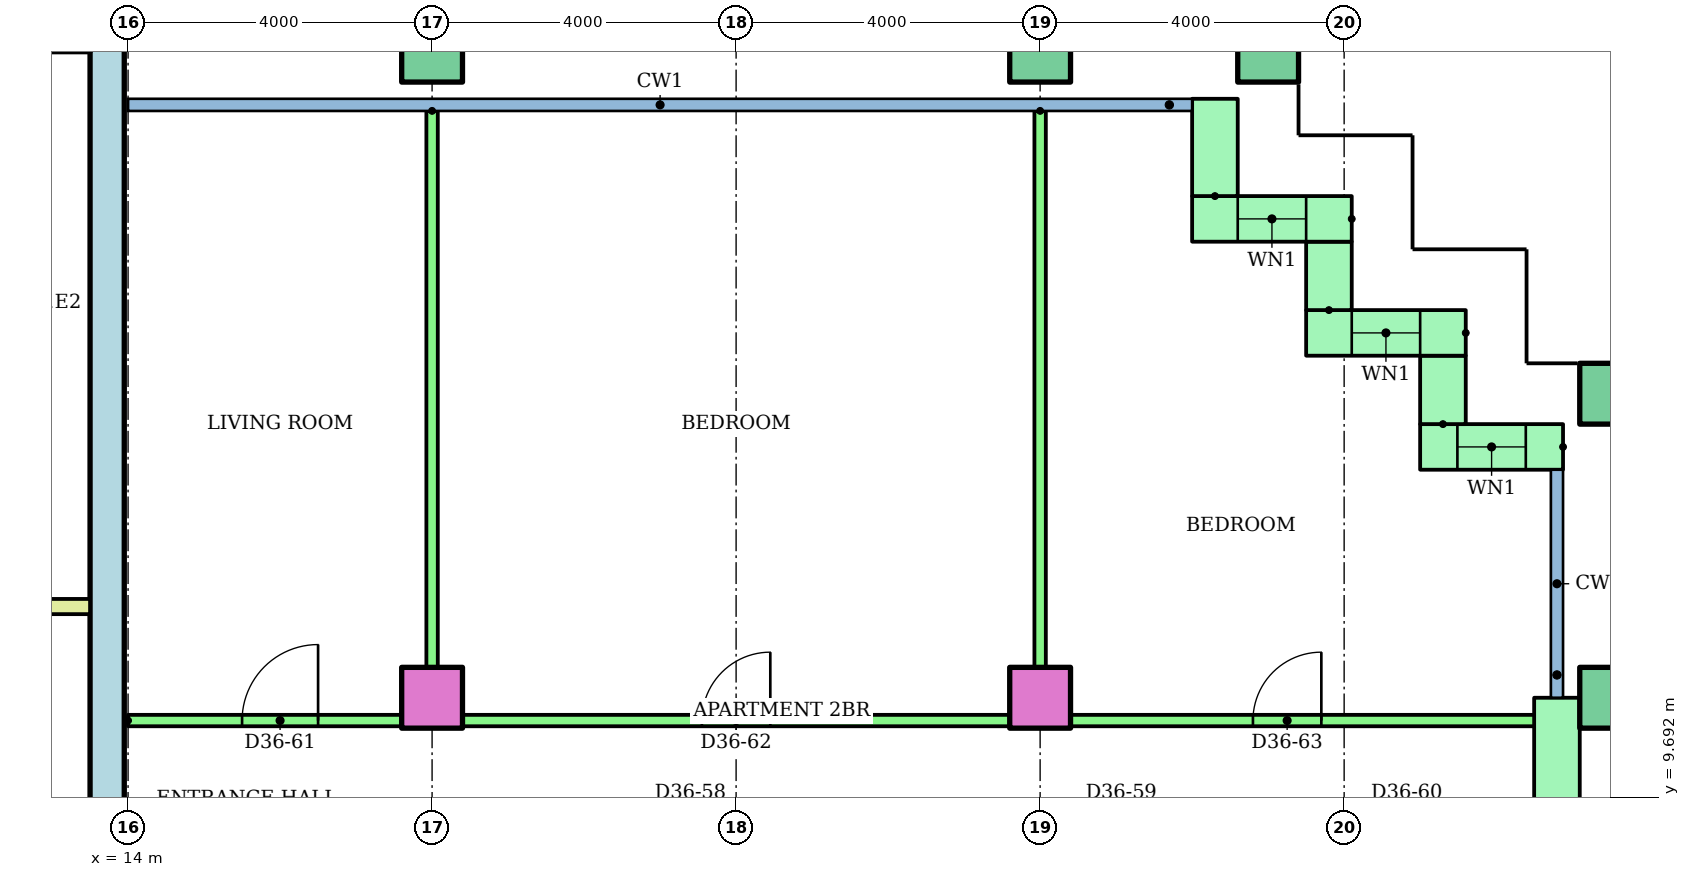
"""IFC4 building model, lengths in metres.
Left out: names, types, materials, properties, quantities, classifications, styles, units other than length and angle.
Written with IfcOpenShell. Run it as: python <this file> out.ifc"""

import sys

from ifc_helpers import new_model, si_unit, direction, frame, frame_2d, origin, origin_2d, place, context, subcontext, project, spatial, rectangle, hollow_rectangle, extrude, element, fill, save


model = new_model("IFC4")
c1 = context("Model", 3, precision=1e-05, world=origin(), true_north=direction((0.0, 1.0)))
c2 = subcontext(c1, "Body", "Model", "MODEL_VIEW")
j1 = project(units=[si_unit("LENGTHUNIT", "METRE"), si_unit("PLANEANGLEUNIT", "RADIAN")], contexts=[c1])
p1 = place(None, origin())
s1 = spatial("IfcSite", under=j1, at=p1, CompositionType="ELEMENT")
p2 = place(p1, origin())
s2 = spatial("IfcBuilding", under=s1, at=p2, CompositionType="ELEMENT")
p3 = place(p2, frame((0.0, 0.0, 139.0)))
s3 = spatial("IfcBuildingStorey", under=s2, at=p3, CompositionType="ELEMENT", Elevation=139.0)
for number, where in (
    (1, (18.0, 11.0, 0.0)),
    (2, (26.0, 11.0, 0.0)),
):
    element("IfcColumn", number, at=place(p3, frame(where)), inside=s3, PredefinedType="COLUMN", context=c2, shape_type="SweptSolid", body=[
        extrude(rectangle(XDim=0.8, YDim=0.8, at=origin_2d()), origin(), (0.0, 0.0, 1.0), 3.2),
    ])
for number, where in (
    (3, (33.5, 11.0, 0.0)),
    (4, (33.5, 15.0, 0.0)),
    (5, (18.0, 19.5, 0.0)),
    (6, (26.0, 19.5, 0.0)),
    (7, (29.0, 19.5, 0.0)),
):
    element("IfcColumn", number, at=place(p3, frame(where)), inside=s3, PredefinedType="COLUMN", context=c2, shape_type="SweptSolid", body=[
        extrude(hollow_rectangle(XDim=0.8, YDim=0.8, WallThickness=0.04, at=origin_2d()), origin(), (0.0, 0.0, 1.0), 3.2),
    ])
p4 = place(p3, frame((32.88, 14.3, 0.0), z_axis=(0.0, 0.0, 1.0), x_axis=(-1.0, 0.0, 0.0)))
e8 = element("IfcWall", 8, at=p4, inside=s3, PredefinedType="STANDARD", context=c2, shape_type="SweptSolid", body=[
    extrude(rectangle(XDim=1.88, YDim=0.6, at=frame_2d((0.94, 0.0))), origin(), (0.0, 0.0, 1.0), 2.92),
])
p5 = place(p4, frame((0.49, 0.0, 0.9)))
e9 = element("IfcOpeningElement", 9, at=p5, cuts=e8, PredefinedType="OPENING", context=c2, shape_type="SweptSolid", body=[
    extrude(rectangle(XDim=0.9, YDim=1.5, at=frame_2d((0.45, 0.75))), frame((0.0, 0.31, 0.0), z_axis=(0.0, -1.0, 0.0), x_axis=(1.0, 0.0, 0.0)), (0.0, 0.0, 1.0), 0.62),
])
p6 = place(p3, frame((31.3, 14.6, 0.0), z_axis=(0.0, 0.0, 1.0), x_axis=(0.0, 1.0, 0.0)))
e10 = element("IfcWall", 10, at=p6, inside=s3, PredefinedType="STANDARD", context=c2, shape_type="SweptSolid", body=[
    extrude(rectangle(XDim=0.9, YDim=0.6, at=frame_2d((0.45, 0.0))), origin(), (0.0, 0.0, 1.0), 2.92),
])
p7 = place(p3, frame((31.6, 15.8, 0.0), z_axis=(0.0, 0.0, 1.0), x_axis=(-1.0, 0.0, 0.0)))
e11 = element("IfcWall", 11, at=p7, inside=s3, PredefinedType="STANDARD", context=c2, shape_type="SweptSolid", body=[
    extrude(rectangle(XDim=2.1, YDim=0.6, at=frame_2d((1.05, 0.0))), origin(), (0.0, 0.0, 1.0), 2.92),
])
p8 = place(p7, frame((0.6, 0.0, 0.9)))
e12 = element("IfcOpeningElement", 12, at=p8, cuts=e11, PredefinedType="OPENING", context=c2, shape_type="SweptSolid", body=[
    extrude(rectangle(XDim=0.9, YDim=1.5, at=frame_2d((0.45, 0.75))), frame((0.0, 0.31, 0.0), z_axis=(0.0, -1.0, 0.0), x_axis=(1.0, 0.0, 0.0)), (0.0, 0.0, 1.0), 0.62),
])
p9 = place(p3, frame((29.8, 16.1, 0.0), z_axis=(0.0, 0.0, 1.0), x_axis=(0.0, 1.0, 0.0)))
e13 = element("IfcWall", 13, at=p9, inside=s3, PredefinedType="STANDARD", context=c2, shape_type="SweptSolid", body=[
    extrude(rectangle(XDim=0.9, YDim=0.6, at=frame_2d((0.45, 0.0))), origin(), (0.0, 0.0, 1.0), 2.92),
])
p10 = place(p3, frame((30.1, 17.3, 0.0), z_axis=(0.0, 0.0, 1.0), x_axis=(-1.0, 0.0, 0.0)))
e14 = element("IfcWall", 14, at=p10, inside=s3, PredefinedType="STANDARD", context=c2, shape_type="SweptSolid", body=[
    extrude(rectangle(XDim=2.1, YDim=0.6, at=frame_2d((1.05, 0.0))), origin(), (0.0, 0.0, 1.0), 2.92),
])
p11 = place(p10, frame((0.6, 0.0, 0.9)))
e15 = element("IfcOpeningElement", 15, at=p11, cuts=e14, PredefinedType="OPENING", context=c2, shape_type="SweptSolid", body=[
    extrude(rectangle(XDim=0.9, YDim=1.5, at=frame_2d((0.45, 0.75))), frame((0.0, 0.31, 0.0), z_axis=(0.0, -1.0, 0.0), x_axis=(1.0, 0.0, 0.0)), (0.0, 0.0, 1.0), 0.62),
])
p12 = place(p3, frame((28.3, 17.6, 0.0), z_axis=(0.0, 0.0, 1.0), x_axis=(0.0, 1.0, 0.0)))
e16 = element("IfcWall", 16, at=p12, inside=s3, PredefinedType="STANDARD", context=c2, shape_type="SweptSolid", body=[
    extrude(rectangle(XDim=1.28, YDim=0.6, at=frame_2d((0.64, 0.0))), origin(), (0.0, 0.0, 1.0), 2.92),
])
p13 = place(p3, frame((32.8, 6.5, 0.0), z_axis=(0.0, 0.0, 1.0), x_axis=(0.0, 1.0, 0.0)))
e17 = element("IfcWall", 17, at=p13, inside=s3, PredefinedType="STANDARD", context=c2, shape_type="SweptSolid", body=[
    extrude(rectangle(XDim=4.5, YDim=0.6, at=frame_2d((2.25, 0.0))), origin(), (0.0, 0.0, 1.0), 2.92),
])
p14 = place(p13, frame((1.325, 0.0, 0.0)))
e18 = element("IfcOpeningElement", 18, at=p14, cuts=e17, PredefinedType="OPENING", context=c2, shape_type="SweptSolid", body=[
    extrude(rectangle(XDim=1.2, YDim=2.1, at=frame_2d((0.6, 1.05))), frame((0.0, 0.31, 0.0), z_axis=(0.0, -1.0, 0.0), x_axis=(1.0, 0.0, 0.0)), (0.0, 0.0, 1.0), 0.62),
])
p15 = place(p3, frame((13.725, 3.0, 0.0), z_axis=(0.0, 0.0, 1.0), x_axis=(0.0, 1.0, 0.0)))
e19 = element("IfcWall", 19, at=p15, inside=s3, PredefinedType="SHEAR", context=c2, shape_type="SweptSolid", body=[
    extrude(rectangle(XDim=17.0, YDim=0.45, at=frame_2d((8.5, 0.0))), origin(), (0.0, 0.0, 1.0), 2.92),
])
p16 = place(p3, frame((9.6, 12.2, 0.0)))
e20 = element("IfcWall", 20, at=p16, inside=s3, PredefinedType="PARTITIONING", context=c2, shape_type="SweptSolid", body=[
    extrude(rectangle(XDim=3.9, YDim=0.2, at=frame_2d((1.95, 0.0))), origin(), (0.0, 0.0, 1.0), 2.92),
])
p17 = place(p3, frame((14.0, 10.7, 0.0)))
e21 = element("IfcWall", 21, at=p17, inside=s3, PredefinedType="PARTITIONING", context=c2, shape_type="SweptSolid", body=[
    extrude(rectangle(XDim=18.71, YDim=0.15, at=frame_2d((9.355, 0.0))), origin(), (0.0, 0.0, 1.0), 2.4),
])
p18 = place(p17, frame((1.5, 0.0, 0.0)))
e22 = element("IfcOpeningElement", 22, at=p18, cuts=e21, PredefinedType="OPENING", context=c2, shape_type="SweptSolid", body=[
    extrude(rectangle(XDim=1.0, YDim=2.1, at=frame_2d((0.5, 1.05))), frame((0.0, 0.085, 0.0), z_axis=(0.0, -1.0, 0.0), x_axis=(1.0, 0.0, 0.0)), (0.0, 0.0, 1.0), 0.17),
])
p19 = place(p17, frame((7.55, 0.0, 0.0)))
e23 = element("IfcOpeningElement", 23, at=p19, cuts=e21, PredefinedType="OPENING", context=c2, shape_type="SweptSolid", body=[
    extrude(rectangle(XDim=0.9, YDim=2.1, at=frame_2d((0.45, 1.05))), frame((0.0, 0.085, 0.0), z_axis=(0.0, -1.0, 0.0), x_axis=(1.0, 0.0, 0.0)), (0.0, 0.0, 1.0), 0.17),
])
p20 = place(p17, frame((14.8, 0.0, 0.0)))
e24 = element("IfcOpeningElement", 24, at=p20, cuts=e21, PredefinedType="OPENING", context=c2, shape_type="SweptSolid", body=[
    extrude(rectangle(XDim=0.9, YDim=2.1, at=frame_2d((0.45, 1.05))), frame((0.0, 0.085, 0.0), z_axis=(0.0, -1.0, 0.0), x_axis=(1.0, 0.0, 0.0)), (0.0, 0.0, 1.0), 0.17),
])
for number, where, z_axis, x_axis in (
    (25, (18.0, 18.721, 0.0), (0.0, 0.0, 1.0), (0.0, -1.0, 0.0)),
    (26, (26.0, 18.721, 0.0), (0.0, 0.0, 1.0), (0.0, -1.0, 0.0)),
):
    element("IfcWall", number, at=place(p3, frame(where, z_axis=z_axis, x_axis=x_axis)), inside=s3, PredefinedType="PARTITIONING", context=c2, shape_type="SweptSolid", body=[
        extrude(rectangle(XDim=8.021, YDim=0.15, at=frame_2d((4.01, 0.0))), origin(), (0.0, 0.0, 1.0), 2.4),
    ])
p21 = place(p5, origin())
e27 = element("IfcWindow", 27, at=p21, inside=s3, PartitioningType="SINGLE_PANEL", PredefinedType="WINDOW", context=c2, shape_type="SweptSolid", body=[
    extrude(rectangle(XDim=0.9, YDim=1.5, at=frame_2d((0.45, 0.75))), frame((0.0, 0.03, 0.0), z_axis=(0.0, -1.0, 0.0), x_axis=(1.0, 0.0, 0.0)), (0.0, 0.0, 1.0), 0.06),
])
fill(e9, e27)
p22 = place(p8, origin())
e28 = element("IfcWindow", 28, at=p22, inside=s3, PartitioningType="SINGLE_PANEL", PredefinedType="WINDOW", context=c2, shape_type="SweptSolid", body=[
    extrude(rectangle(XDim=0.9, YDim=1.5, at=frame_2d((0.45, 0.75))), frame((0.0, 0.03, 0.0), z_axis=(0.0, -1.0, 0.0), x_axis=(1.0, 0.0, 0.0)), (0.0, 0.0, 1.0), 0.06),
])
fill(e12, e28)
p23 = place(p11, origin())
e29 = element("IfcWindow", 29, at=p23, inside=s3, PartitioningType="SINGLE_PANEL", PredefinedType="WINDOW", context=c2, shape_type="SweptSolid", body=[
    extrude(rectangle(XDim=0.9, YDim=1.5, at=frame_2d((0.45, 0.75))), frame((0.0, 0.03, 0.0), z_axis=(0.0, -1.0, 0.0), x_axis=(1.0, 0.0, 0.0)), (0.0, 0.0, 1.0), 0.06),
])
fill(e15, e29)
p24 = place(p18, origin())
e30 = element("IfcDoor", 30, at=p24, inside=s3, OperationType="SINGLE_SWING_RIGHT", PredefinedType="DOOR", context=c2, shape_type="SweptSolid", body=[
    extrude(rectangle(XDim=1.0, YDim=2.1, at=frame_2d((0.5, 1.05))), frame((0.0, 0.025, 0.0), z_axis=(0.0, -1.0, 0.0), x_axis=(1.0, 0.0, 0.0)), (0.0, 0.0, 1.0), 0.05),
])
fill(e22, e30)
p25 = place(p19, origin())
e31 = element("IfcDoor", 31, at=p25, inside=s3, OperationType="SINGLE_SWING_RIGHT", PredefinedType="DOOR", context=c2, shape_type="SweptSolid", body=[
    extrude(rectangle(XDim=0.9, YDim=2.1, at=frame_2d((0.45, 1.05))), frame((0.0, 0.025, 0.0), z_axis=(0.0, -1.0, 0.0), x_axis=(1.0, 0.0, 0.0)), (0.0, 0.0, 1.0), 0.05),
])
fill(e23, e31)
p26 = place(p20, origin())
e32 = element("IfcDoor", 32, at=p26, inside=s3, OperationType="SINGLE_SWING_RIGHT", PredefinedType="DOOR", context=c2, shape_type="SweptSolid", body=[
    extrude(rectangle(XDim=0.9, YDim=2.1, at=frame_2d((0.45, 1.05))), frame((0.0, 0.025, 0.0), z_axis=(0.0, -1.0, 0.0), x_axis=(1.0, 0.0, 0.0)), (0.0, 0.0, 1.0), 0.05),
])
fill(e24, e32)
save(model, sys.argv[1])
